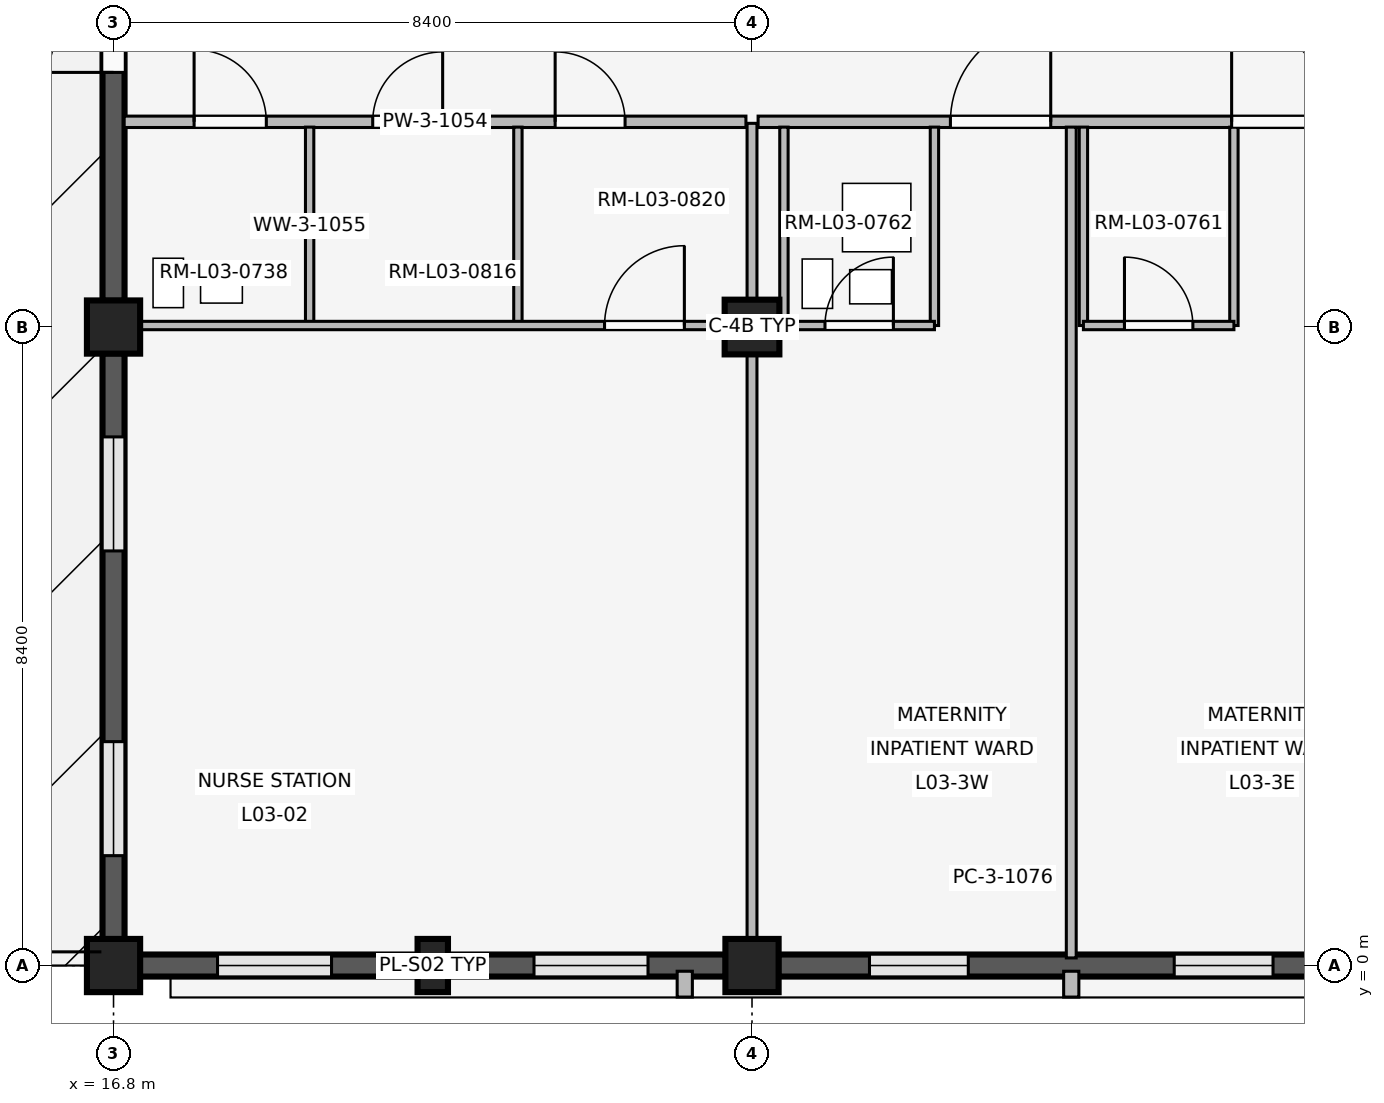
"""IFC4 building model, lengths in metres.
Left out: names, types, materials, properties, quantities, classifications, styles, units other than length and angle.
Written with IfcOpenShell. Run it as: python <this file> out.ifc"""

import sys

from ifc_helpers import new_model, si_unit, direction, frame, frame_2d, origin, origin_2d, place, context, subcontext, project, spatial, rectangle, extrude, element, fill, save


model = new_model("IFC4")
c1 = context("Model", 3, precision=1e-05, world=origin(), true_north=direction((0.0, 1.0)))
c2 = subcontext(c1, "Body", "Model", "MODEL_VIEW")
j1 = project(units=[si_unit("LENGTHUNIT", "METRE"), si_unit("PLANEANGLEUNIT", "RADIAN")], contexts=[c1])
p1 = place(None, origin())
s1 = spatial("IfcSite", under=j1, at=p1, CompositionType="ELEMENT")
p2 = place(p1, origin())
s2 = spatial("IfcBuilding", under=s1, at=p2, CompositionType="ELEMENT")
p3 = place(p2, frame((0.0, 0.0, 12.9)))
s3 = spatial("IfcBuildingStorey", under=s2, at=p3, CompositionType="ELEMENT", Elevation=12.9)
for number, where, z_axis, x_axis in (
    (1, (16.8, 0.0, 0.0), (0.0, 0.0, 1.0), (1.0, 0.0, 0.0)),
    (2, (16.8, 8.4, 0.0), (0.0, 0.0, 1.0), (1.0, 0.0, 0.0)),
    (3, (25.2, 0.0, 0.0), (0.0, 0.0, 1.0), (1.0, 0.0, 0.0)),
):
    element("IfcColumn", number, at=place(p3, frame(where, z_axis=z_axis, x_axis=x_axis)), inside=s3, PredefinedType="COLUMN", context=c2, shape_type="SweptSolid", body=[
        extrude(rectangle(XDim=0.7, YDim=0.7, at=origin_2d()), origin(), (0.0, 0.0, 1.0), 3.3),
    ])
p4 = place(p3, frame((25.2, 8.4, 0.0), z_axis=(0.0, 0.0, 1.0), x_axis=(1.0, 0.0, 0.0)))
e4 = element("IfcColumn", 4, at=p4, inside=s3, PredefinedType="COLUMN", context=c2, shape_type="SweptSolid", body=[
    extrude(rectangle(XDim=0.72, YDim=0.72, at=origin_2d()), origin(), (0.0, 0.0, 1.0), 3.3),
])
p5 = place(p3, frame((21.0, 0.0, 0.0), z_axis=(0.0, 0.0, 1.0), x_axis=(1.0, 0.0, 0.0)))
e5 = element("IfcColumn", 5, at=p5, inside=s3, PredefinedType="PILASTER", context=c2, shape_type="SweptSolid", body=[
    extrude(rectangle(XDim=0.4, YDim=0.7, at=origin_2d()), origin(), (0.0, 0.0, 1.0), 3.3),
])
p6 = place(p3, frame((24.855, 0.0, 0.0), z_axis=(0.0, 0.0, 1.0), x_axis=(-1.0, 0.0, 0.0)))
e6 = element("IfcWall", 6, at=p6, inside=s3, PredefinedType="SOLIDWALL", context=c2, shape_type="SweptSolid", body=[
    extrude(rectangle(XDim=7.71, YDim=0.29, at=frame_2d((3.855, 0.0))), origin(), (0.0, 0.0, 1.0), 2.44),
])
p7 = place(p6, frame((1.023, 0.0, 1.05)))
e7 = element("IfcOpeningElement", 7, at=p7, cuts=e6, PredefinedType="OPENING", context=c2, shape_type="SweptSolid", body=[
    extrude(rectangle(XDim=1.5, YDim=0.75, at=frame_2d((0.75, 0.375))), frame((0.0, 0.155, 0.0), z_axis=(0.0, -1.0, 0.0), x_axis=(1.0, 0.0, 0.0)), (0.0, 0.0, 1.0), 0.31),
])
p8 = place(p6, frame((5.187, 0.0, 1.05)))
e8 = element("IfcOpeningElement", 8, at=p8, cuts=e6, PredefinedType="OPENING", context=c2, shape_type="SweptSolid", body=[
    extrude(rectangle(XDim=1.5, YDim=0.75, at=frame_2d((0.75, 0.375))), frame((0.0, 0.155, 0.0), z_axis=(0.0, -1.0, 0.0), x_axis=(1.0, 0.0, 0.0)), (0.0, 0.0, 1.0), 0.31),
])
p9 = place(p3, frame((24.315, -0.075, 0.0), z_axis=(0.0, 0.0, 1.0), x_axis=(0.0, -1.0, 0.0)))
e9 = element("IfcWall", 9, at=p9, inside=s3, PredefinedType="ELEMENTEDWALL", context=c2, shape_type="SweptSolid", body=[
    extrude(rectangle(XDim=0.34, YDim=0.2, at=frame_2d((0.17, 0.0))), origin(), (0.0, 0.0, 1.0), 2.42),
])
p10 = place(p3, frame((16.8, 0.345, 0.0), z_axis=(0.0, 0.0, 1.0), x_axis=(0.0, 1.0, 0.0)))
e10 = element("IfcWall", 10, at=p10, inside=s3, PredefinedType="SOLIDWALL", context=c2, shape_type="SweptSolid", body=[
    extrude(rectangle(XDim=7.71, YDim=0.29, at=frame_2d((3.855, 0.0))), origin(), (0.0, 0.0, 1.0), 2.44),
])
p11 = place(p10, frame((1.1, 0.0, 1.05)))
e11 = element("IfcOpeningElement", 11, at=p11, cuts=e10, PredefinedType="OPENING", context=c2, shape_type="SweptSolid", body=[
    extrude(rectangle(XDim=1.5, YDim=0.75, at=frame_2d((0.75, 0.375))), frame((0.0, 0.155, 0.0), z_axis=(0.0, -1.0, 0.0), x_axis=(1.0, 0.0, 0.0)), (0.0, 0.0, 1.0), 0.31),
])
p12 = place(p10, frame((5.11, 0.0, 1.05)))
e12 = element("IfcOpeningElement", 12, at=p12, cuts=e10, PredefinedType="OPENING", context=c2, shape_type="SweptSolid", body=[
    extrude(rectangle(XDim=1.5, YDim=0.75, at=frame_2d((0.75, 0.375))), frame((0.0, 0.155, 0.0), z_axis=(0.0, -1.0, 0.0), x_axis=(1.0, 0.0, 0.0)), (0.0, 0.0, 1.0), 0.31),
])
p13 = place(p3, frame((16.8, 8.745, 0.0), z_axis=(0.0, 0.0, 1.0), x_axis=(0.0, 1.0, 0.0)))
e13 = element("IfcWall", 13, at=p13, inside=s3, PredefinedType="SOLIDWALL", context=c2, shape_type="SweptSolid", body=[
    extrude(rectangle(XDim=7.71, YDim=0.29, at=frame_2d((3.855, 0.0))), origin(), (0.0, 0.0, 1.0), 2.44),
])
p14 = place(p13, frame((3.005, 0.0, 0.0)))
e14 = element("IfcOpeningElement", 14, at=p14, cuts=e13, PredefinedType="OPENING", context=c2, shape_type="SweptSolid", body=[
    extrude(rectangle(XDim=1.7, YDim=2.3, at=frame_2d((0.85, 1.15))), frame((0.0, 0.155, 0.0), z_axis=(0.0, -1.0, 0.0), x_axis=(1.0, 0.0, 0.0)), (0.0, 0.0, 1.0), 0.31),
])
p15 = place(p3, frame((33.255, 0.0, 0.0), z_axis=(0.0, 0.0, 1.0), x_axis=(-1.0, 0.0, 0.0)))
e15 = element("IfcWall", 15, at=p15, inside=s3, PredefinedType="SOLIDWALL", context=c2, shape_type="SweptSolid", body=[
    extrude(rectangle(XDim=7.71, YDim=0.29, at=frame_2d((3.855, 0.0))), origin(), (0.0, 0.0, 1.0), 2.44),
])
p16 = place(p15, frame((1.2, 0.0, 1.05)))
e16 = element("IfcOpeningElement", 16, at=p16, cuts=e15, PredefinedType="OPENING", context=c2, shape_type="SweptSolid", body=[
    extrude(rectangle(XDim=1.3, YDim=0.75, at=frame_2d((0.65, 0.375))), frame((0.0, 0.155, 0.0), z_axis=(0.0, -1.0, 0.0), x_axis=(1.0, 0.0, 0.0)), (0.0, 0.0, 1.0), 0.31),
])
p17 = place(p15, frame((5.21, 0.0, 1.05)))
e17 = element("IfcOpeningElement", 17, at=p17, cuts=e15, PredefinedType="OPENING", context=c2, shape_type="SweptSolid", body=[
    extrude(rectangle(XDim=1.3, YDim=0.75, at=frame_2d((0.65, 0.375))), frame((0.0, 0.155, 0.0), z_axis=(0.0, -1.0, 0.0), x_axis=(1.0, 0.0, 0.0)), (0.0, 0.0, 1.0), 0.31),
])
p18 = place(p3, frame((29.4, -0.075, 0.0), z_axis=(0.0, 0.0, 1.0), x_axis=(0.0, -1.0, 0.0)))
e18 = element("IfcWall", 18, at=p18, inside=s3, PredefinedType="ELEMENTEDWALL", context=c2, shape_type="SweptSolid", body=[
    extrude(rectangle(XDim=0.34, YDim=0.2, at=frame_2d((0.17, 0.0))), origin(), (0.0, 0.0, 1.0), 2.42),
])
p19 = place(p3, frame((16.94, 11.1, 0.0), z_axis=(0.0, 0.0, 1.0), x_axis=(1.0, 0.0, 0.0)))
e19 = element("IfcWall", 19, at=p19, inside=s3, PredefinedType="PARTITIONING", context=c2, shape_type="SweptSolid", body=[
    extrude(rectangle(XDim=8.18, YDim=0.15, at=frame_2d((4.09, 0.0))), origin(), (0.0, 0.0, 1.0), 2.42),
])
p20 = place(p19, frame((0.92, 0.0, 0.0)))
e20 = element("IfcOpeningElement", 20, at=p20, cuts=e19, PredefinedType="OPENING", context=c2, shape_type="SweptSolid", body=[
    extrude(rectangle(XDim=0.95, YDim=2.15, at=frame_2d((0.475, 1.075))), frame((0.0, 0.085, 0.0), z_axis=(0.0, -1.0, 0.0), x_axis=(1.0, 0.0, 0.0)), (0.0, 0.0, 1.0), 0.17),
])
p21 = place(p19, frame((3.27, 0.0, 0.0)))
e21 = element("IfcOpeningElement", 21, at=p21, cuts=e19, PredefinedType="OPENING", context=c2, shape_type="SweptSolid", body=[
    extrude(rectangle(XDim=0.92, YDim=2.1, at=frame_2d((0.46, 1.05))), frame((0.0, 0.085, 0.0), z_axis=(0.0, -1.0, 0.0), x_axis=(1.0, 0.0, 0.0)), (0.0, 0.0, 1.0), 0.17),
])
p22 = place(p19, frame((5.67, 0.0, 0.0)))
e22 = element("IfcOpeningElement", 22, at=p22, cuts=e19, PredefinedType="OPENING", context=c2, shape_type="SweptSolid", body=[
    extrude(rectangle(XDim=0.92, YDim=2.1, at=frame_2d((0.46, 1.05))), frame((0.0, 0.085, 0.0), z_axis=(0.0, -1.0, 0.0), x_axis=(1.0, 0.0, 0.0)), (0.0, 0.0, 1.0), 0.17),
])
for number, where, z_axis, x_axis in (
    (23, (19.38, 8.44, 0.0), (0.0, 0.0, 1.0), (0.0, 1.0, 0.0)),
    (24, (22.12, 8.44, 0.0), (0.0, 0.0, 1.0), (0.0, 1.0, 0.0)),
):
    element("IfcWall", number, at=place(p3, frame(where, z_axis=z_axis, x_axis=x_axis)), inside=s3, PredefinedType="PARTITIONING", context=c2, shape_type="SweptSolid", body=[
        extrude(rectangle(XDim=2.59, YDim=0.11, at=frame_2d((1.295, 0.0))), origin(), (0.0, 0.0, 1.0), 2.42),
    ])
p23 = place(p3, frame((16.94, 8.42, 0.0), z_axis=(0.0, 0.0, 1.0), x_axis=(1.0, 0.0, 0.0)))
e25 = element("IfcWall", 25, at=p23, inside=s3, PredefinedType="PARTITIONING", context=c2, shape_type="SweptSolid", body=[
    extrude(rectangle(XDim=8.18, YDim=0.11, at=frame_2d((4.09, 0.0))), origin(), (0.0, 0.0, 1.0), 2.42),
])
p24 = place(p23, frame((6.32, 0.0, 0.0)))
e26 = element("IfcOpeningElement", 26, at=p24, cuts=e25, PredefinedType="OPENING", context=c2, shape_type="SweptSolid", body=[
    extrude(rectangle(XDim=1.05, YDim=2.2, at=frame_2d((0.525, 1.1))), frame((0.0, 0.065, 0.0), z_axis=(0.0, -1.0, 0.0), x_axis=(1.0, 0.0, 0.0)), (0.0, 0.0, 1.0), 0.13),
])
p25 = place(p3, frame((25.2, 0.14, 0.0), z_axis=(0.0, 0.0, 1.0), x_axis=(0.0, 1.0, 0.0)))
e27 = element("IfcWall", 27, at=p25, inside=s3, PredefinedType="PARTITIONING", context=c2, shape_type="SweptSolid", body=[
    extrude(rectangle(XDim=10.94, YDim=0.13, at=frame_2d((5.47, 0.0))), origin(), (0.0, 0.0, 1.0), 2.42),
])
p26 = place(p3, frame((25.28, 11.1, 0.0), z_axis=(0.0, 0.0, 1.0), x_axis=(1.0, 0.0, 0.0)))
e28 = element("IfcWall", 28, at=p26, inside=s3, PredefinedType="PARTITIONING", context=c2, shape_type="SweptSolid", body=[
    extrude(rectangle(XDim=8.24, YDim=0.15, at=frame_2d((4.12, 0.0))), origin(), (0.0, 0.0, 1.0), 2.42),
])
p27 = place(p26, frame((2.53, 0.0, 0.0)))
e29 = element("IfcOpeningElement", 29, at=p27, cuts=e28, PredefinedType="OPENING", context=c2, shape_type="SweptSolid", body=[
    extrude(rectangle(XDim=1.32, YDim=2.25, at=frame_2d((0.66, 1.125))), frame((0.0, 0.085, 0.0), z_axis=(0.0, -1.0, 0.0), x_axis=(1.0, 0.0, 0.0)), (0.0, 0.0, 1.0), 0.17),
])
p28 = place(p26, frame((6.23, 0.0, 0.0)))
e30 = element("IfcOpeningElement", 30, at=p28, cuts=e28, PredefinedType="OPENING", context=c2, shape_type="SweptSolid", body=[
    extrude(rectangle(XDim=1.32, YDim=2.25, at=frame_2d((0.66, 1.125))), frame((0.0, 0.085, 0.0), z_axis=(0.0, -1.0, 0.0), x_axis=(1.0, 0.0, 0.0)), (0.0, 0.0, 1.0), 0.17),
])
p29 = place(p3, frame((29.4, 0.1, 0.0), z_axis=(0.0, 0.0, 1.0), x_axis=(0.0, 1.0, 0.0)))
e31 = element("IfcWall", 31, at=p29, inside=s3, PredefinedType="PARTITIONING", context=c2, shape_type="SweptSolid", body=[
    extrude(rectangle(XDim=10.93, YDim=0.13, at=frame_2d((5.465, 0.0))), origin(), (0.0, 0.0, 1.0), 2.42),
])
for number, where, z_axis, x_axis in (
    (32, (25.62, 8.42, 0.0), (0.0, 0.0, 1.0), (0.0, 1.0, 0.0)),
    (33, (27.6, 8.42, 0.0), (0.0, 0.0, 1.0), (0.0, 1.0, 0.0)),
):
    element("IfcWall", number, at=place(p3, frame(where, z_axis=z_axis, x_axis=x_axis)), inside=s3, PredefinedType="PARTITIONING", context=c2, shape_type="SweptSolid", body=[
        extrude(rectangle(XDim=2.61, YDim=0.11, at=frame_2d((1.305, 0.0))), origin(), (0.0, 0.0, 1.0), 2.42),
    ])
p30 = place(p3, frame((25.62, 8.42, 0.0), z_axis=(0.0, 0.0, 1.0), x_axis=(1.0, 0.0, 0.0)))
e34 = element("IfcWall", 34, at=p30, inside=s3, PredefinedType="PARTITIONING", context=c2, shape_type="SweptSolid", body=[
    extrude(rectangle(XDim=1.98, YDim=0.11, at=frame_2d((0.99, 0.0))), origin(), (0.0, 0.0, 1.0), 2.42),
])
p31 = place(p30, frame((0.54, 0.0, 0.0)))
e35 = element("IfcOpeningElement", 35, at=p31, cuts=e34, PredefinedType="OPENING", context=c2, shape_type="SweptSolid", body=[
    extrude(rectangle(XDim=0.9, YDim=2.1, at=frame_2d((0.45, 1.05))), frame((0.0, 0.065, 0.0), z_axis=(0.0, -1.0, 0.0), x_axis=(1.0, 0.0, 0.0)), (0.0, 0.0, 1.0), 0.13),
])
for number, where, z_axis, x_axis in (
    (36, (29.56, 8.42, 0.0), (0.0, 0.0, 1.0), (0.0, 1.0, 0.0)),
    (37, (31.54, 8.42, 0.0), (0.0, 0.0, 1.0), (0.0, 1.0, 0.0)),
):
    element("IfcWall", number, at=place(p3, frame(where, z_axis=z_axis, x_axis=x_axis)), inside=s3, PredefinedType="PARTITIONING", context=c2, shape_type="SweptSolid", body=[
        extrude(rectangle(XDim=2.61, YDim=0.11, at=frame_2d((1.305, 0.0))), origin(), (0.0, 0.0, 1.0), 2.42),
    ])
p32 = place(p3, frame((29.56, 8.42, 0.0), z_axis=(0.0, 0.0, 1.0), x_axis=(1.0, 0.0, 0.0)))
e38 = element("IfcWall", 38, at=p32, inside=s3, PredefinedType="PARTITIONING", context=c2, shape_type="SweptSolid", body=[
    extrude(rectangle(XDim=1.98, YDim=0.11, at=frame_2d((0.99, 0.0))), origin(), (0.0, 0.0, 1.0), 2.42),
])
p33 = place(p32, frame((0.54, 0.0, 0.0)))
e39 = element("IfcOpeningElement", 39, at=p33, cuts=e38, PredefinedType="OPENING", context=c2, shape_type="SweptSolid", body=[
    extrude(rectangle(XDim=0.9, YDim=2.1, at=frame_2d((0.45, 1.05))), frame((0.0, 0.065, 0.0), z_axis=(0.0, -1.0, 0.0), x_axis=(1.0, 0.0, 0.0)), (0.0, 0.0, 1.0), 0.13),
])
p34 = place(p3, frame((28.05, 1.15, 0.0), z_axis=(0.0, 0.0, 1.0), x_axis=(1.0, 0.0, 0.0)))
e40 = element("IfcWall", 40, at=p34, inside=s3, PredefinedType="PLUMBINGWALL", context=c2, shape_type="SweptSolid", body=[
    extrude(rectangle(XDim=0.9, YDim=0.24, at=frame_2d((0.45, 0.0))), origin(), (0.0, 0.0, 1.0), 2.42),
])
p35 = place(p7, origin())
e41 = element("IfcWindow", 41, at=p35, inside=s3, PartitioningType="SINGLE_PANEL", PredefinedType="WINDOW", context=c2, shape_type="SweptSolid", body=[
    extrude(rectangle(XDim=1.5, YDim=0.75, at=frame_2d((0.75, 0.375))), frame((0.0, 0.03, 0.0), z_axis=(0.0, -1.0, 0.0), x_axis=(1.0, 0.0, 0.0)), (0.0, 0.0, 1.0), 0.06),
])
fill(e7, e41)
p36 = place(p8, origin())
e42 = element("IfcWindow", 42, at=p36, inside=s3, PartitioningType="SINGLE_PANEL", PredefinedType="WINDOW", context=c2, shape_type="SweptSolid", body=[
    extrude(rectangle(XDim=1.5, YDim=0.75, at=frame_2d((0.75, 0.375))), frame((0.0, 0.03, 0.0), z_axis=(0.0, -1.0, 0.0), x_axis=(1.0, 0.0, 0.0)), (0.0, 0.0, 1.0), 0.06),
])
fill(e8, e42)
p37 = place(p11, origin())
e43 = element("IfcWindow", 43, at=p37, inside=s3, PartitioningType="SINGLE_PANEL", PredefinedType="WINDOW", context=c2, shape_type="SweptSolid", body=[
    extrude(rectangle(XDim=1.5, YDim=0.75, at=frame_2d((0.75, 0.375))), frame((0.0, 0.03, 0.0), z_axis=(0.0, -1.0, 0.0), x_axis=(1.0, 0.0, 0.0)), (0.0, 0.0, 1.0), 0.06),
])
fill(e11, e43)
p38 = place(p12, origin())
e44 = element("IfcWindow", 44, at=p38, inside=s3, PartitioningType="SINGLE_PANEL", PredefinedType="WINDOW", context=c2, shape_type="SweptSolid", body=[
    extrude(rectangle(XDim=1.5, YDim=0.75, at=frame_2d((0.75, 0.375))), frame((0.0, 0.03, 0.0), z_axis=(0.0, -1.0, 0.0), x_axis=(1.0, 0.0, 0.0)), (0.0, 0.0, 1.0), 0.06),
])
fill(e12, e44)
p39 = place(p14, origin())
e45 = element("IfcDoor", 45, at=p39, inside=s3, OperationType="DOUBLE_SWING_LEFT", PredefinedType="DOOR", context=c2, shape_type="SweptSolid", body=[
    extrude(rectangle(XDim=1.7, YDim=2.3, at=frame_2d((0.85, 1.15))), frame((0.0, 0.025, 0.0), z_axis=(0.0, -1.0, 0.0), x_axis=(1.0, 0.0, 0.0)), (0.0, 0.0, 1.0), 0.05),
])
fill(e14, e45)
p40 = place(p16, origin())
e46 = element("IfcWindow", 46, at=p40, inside=s3, PartitioningType="SINGLE_PANEL", PredefinedType="WINDOW", context=c2, shape_type="SweptSolid", body=[
    extrude(rectangle(XDim=1.3, YDim=0.75, at=frame_2d((0.65, 0.375))), frame((0.0, 0.03, 0.0), z_axis=(0.0, -1.0, 0.0), x_axis=(1.0, 0.0, 0.0)), (0.0, 0.0, 1.0), 0.06),
])
fill(e16, e46)
p41 = place(p17, origin())
e47 = element("IfcWindow", 47, at=p41, inside=s3, PartitioningType="SINGLE_PANEL", PredefinedType="WINDOW", context=c2, shape_type="SweptSolid", body=[
    extrude(rectangle(XDim=1.3, YDim=0.75, at=frame_2d((0.65, 0.375))), frame((0.0, 0.03, 0.0), z_axis=(0.0, -1.0, 0.0), x_axis=(1.0, 0.0, 0.0)), (0.0, 0.0, 1.0), 0.06),
])
fill(e17, e47)
p42 = place(p20, origin())
e48 = element("IfcDoor", 48, at=p42, inside=s3, OperationType="SINGLE_SWING_LEFT", PredefinedType="DOOR", context=c2, shape_type="SweptSolid", body=[
    extrude(rectangle(XDim=0.95, YDim=2.15, at=frame_2d((0.475, 1.075))), frame((0.0, 0.025, 0.0), z_axis=(0.0, -1.0, 0.0), x_axis=(1.0, 0.0, 0.0)), (0.0, 0.0, 1.0), 0.05),
])
fill(e20, e48)
p43 = place(p21, origin())
e49 = element("IfcDoor", 49, at=p43, inside=s3, OperationType="SINGLE_SWING_RIGHT", PredefinedType="DOOR", context=c2, shape_type="SweptSolid", body=[
    extrude(rectangle(XDim=0.92, YDim=2.1, at=frame_2d((0.46, 1.05))), frame((0.0, 0.025, 0.0), z_axis=(0.0, -1.0, 0.0), x_axis=(1.0, 0.0, 0.0)), (0.0, 0.0, 1.0), 0.05),
])
fill(e21, e49)
p44 = place(p22, origin())
e50 = element("IfcDoor", 50, at=p44, inside=s3, OperationType="SINGLE_SWING_LEFT", PredefinedType="DOOR", context=c2, shape_type="SweptSolid", body=[
    extrude(rectangle(XDim=0.92, YDim=2.1, at=frame_2d((0.46, 1.05))), frame((0.0, 0.025, 0.0), z_axis=(0.0, -1.0, 0.0), x_axis=(1.0, 0.0, 0.0)), (0.0, 0.0, 1.0), 0.05),
])
fill(e22, e50)
p45 = place(p24, origin())
e51 = element("IfcDoor", 51, at=p45, inside=s3, OperationType="SINGLE_SWING_RIGHT", PredefinedType="DOOR", context=c2, shape_type="SweptSolid", body=[
    extrude(rectangle(XDim=1.05, YDim=2.2, at=frame_2d((0.525, 1.1))), frame((0.0, 0.025, 0.0), z_axis=(0.0, -1.0, 0.0), x_axis=(1.0, 0.0, 0.0)), (0.0, 0.0, 1.0), 0.05),
])
fill(e26, e51)
p46 = place(p27, origin())
e52 = element("IfcDoor", 52, at=p46, inside=s3, OperationType="SINGLE_SWING_RIGHT", PredefinedType="DOOR", context=c2, shape_type="SweptSolid", body=[
    extrude(rectangle(XDim=1.32, YDim=2.25, at=frame_2d((0.66, 1.125))), frame((0.0, 0.025, 0.0), z_axis=(0.0, -1.0, 0.0), x_axis=(1.0, 0.0, 0.0)), (0.0, 0.0, 1.0), 0.05),
])
fill(e29, e52)
p47 = place(p28, origin())
e53 = element("IfcDoor", 53, at=p47, inside=s3, OperationType="SINGLE_SWING_LEFT", PredefinedType="DOOR", context=c2, shape_type="SweptSolid", body=[
    extrude(rectangle(XDim=1.32, YDim=2.25, at=frame_2d((0.66, 1.125))), frame((0.0, 0.025, 0.0), z_axis=(0.0, -1.0, 0.0), x_axis=(1.0, 0.0, 0.0)), (0.0, 0.0, 1.0), 0.05),
])
fill(e30, e53)
p48 = place(p31, origin())
e54 = element("IfcDoor", 54, at=p48, inside=s3, OperationType="SINGLE_SWING_RIGHT", PredefinedType="DOOR", context=c2, shape_type="SweptSolid", body=[
    extrude(rectangle(XDim=0.9, YDim=2.1, at=frame_2d((0.45, 1.05))), frame((0.0, 0.025, 0.0), z_axis=(0.0, -1.0, 0.0), x_axis=(1.0, 0.0, 0.0)), (0.0, 0.0, 1.0), 0.05),
])
fill(e35, e54)
p49 = place(p33, origin())
e55 = element("IfcDoor", 55, at=p49, inside=s3, OperationType="SINGLE_SWING_LEFT", PredefinedType="DOOR", context=c2, shape_type="SweptSolid", body=[
    extrude(rectangle(XDim=0.9, YDim=2.1, at=frame_2d((0.45, 1.05))), frame((0.0, 0.025, 0.0), z_axis=(0.0, -1.0, 0.0), x_axis=(1.0, 0.0, 0.0)), (0.0, 0.0, 1.0), 0.05),
])
fill(e39, e55)
save(model, sys.argv[1])
